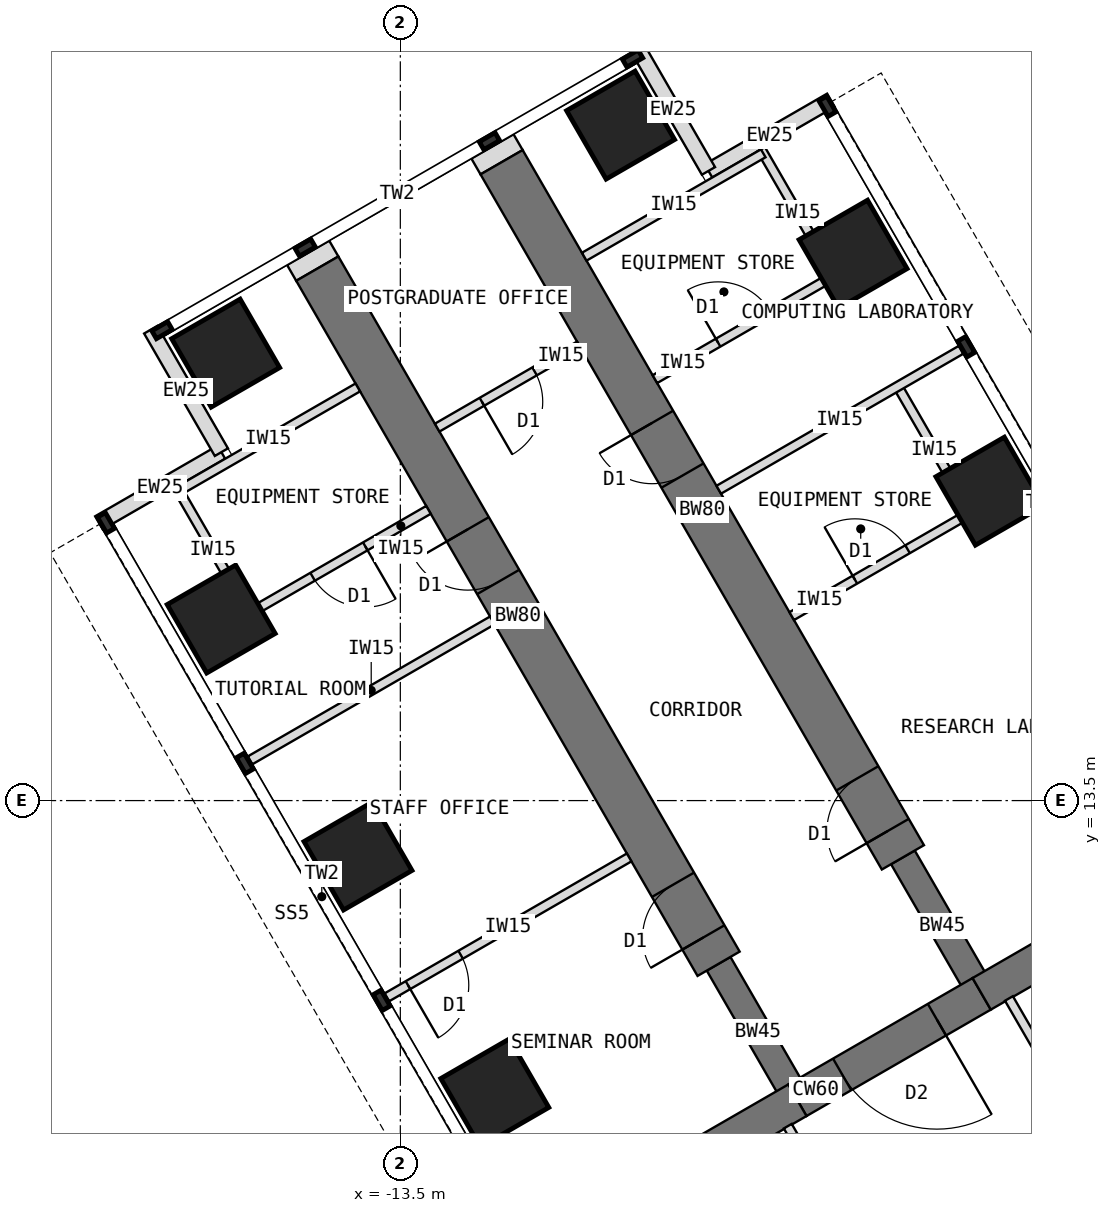
"""IFC4 building model, lengths in metres.
Left out: names, types, materials, properties, quantities, classifications, styles, units other than length and angle.
Written with IfcOpenShell. Run it as: python <this file> out.ifc"""

import sys

from ifc_helpers import new_model, si_unit, direction, frame, frame_2d, origin, origin_2d, place, context, subcontext, project, spatial, rectangle, extrude, element, fill, save


model = new_model("IFC4")
c1 = context("Model", 3, precision=1e-05, world=origin(), true_north=direction((0.0, 1.0)))
c2 = subcontext(c1, "Body", "Model", "MODEL_VIEW")
j1 = project(units=[si_unit("LENGTHUNIT", "METRE"), si_unit("PLANEANGLEUNIT", "RADIAN")], contexts=[c1])
p1 = place(None, origin())
s1 = spatial("IfcSite", under=j1, at=p1, CompositionType="ELEMENT")
p2 = place(p1, origin())
s2 = spatial("IfcBuilding", under=s1, at=p2, CompositionType="ELEMENT")
p3 = place(p2, frame((0.0, 0.0, 133.5)))
s3 = spatial("IfcBuildingStorey", under=s2, at=p3, CompositionType="ELEMENT", Elevation=133.5)
p4 = place(p3, frame((0.0, 12.596, 0.0), z_axis=(0.0, 0.0, 1.0), x_axis=(-0.866011268655, -0.500024481964, 0.0)))
e1 = element("IfcWall", 1, at=p4, inside=s3, PredefinedType="SHEAR", context=c2, shape_type="SweptSolid", body=[
    extrude(rectangle(XDim=4.548, YDim=0.6, at=frame_2d((2.274, 0.0))), origin(), (0.0, 0.0, 1.0), 4.0),
])
p5 = place(p3, frame((-3.939, 10.322, 0.0), z_axis=(0.0, 0.0, 1.0), x_axis=(-0.866019471182, -0.500010275428, 0.0)))
e2 = element("IfcWall", 2, at=p5, inside=s3, PredefinedType="SHEAR", context=c2, shape_type="SweptSolid", body=[
    extrude(rectangle(XDim=3.5, YDim=0.6, at=frame_2d((1.75, 0.0))), origin(), (0.0, 0.0, 1.0), 4.0),
])
p6 = place(p5, frame((0.85, 0.0, 0.0)))
e3 = element("IfcOpeningElement", 3, at=p6, cuts=e2, PredefinedType="OPENING", context=c2, shape_type="SweptSolid", body=[
    extrude(rectangle(XDim=1.8, YDim=2.1, at=frame_2d((0.9, 1.05))), frame((0.0, 0.31, 0.0), z_axis=(0.0, -1.0, 0.0), x_axis=(1.0, 0.0, 0.0)), (0.0, 0.0, 1.0), 0.62),
])
p7 = place(p3, frame((-6.97, 8.572, 0.0), z_axis=(0.0, 0.0, 1.0), x_axis=(-0.866034513004, -0.499984222037, 0.0)))
e4 = element("IfcWall", 4, at=p7, inside=s3, PredefinedType="SHEAR", context=c2, shape_type="SweptSolid", body=[
    extrude(rectangle(XDim=4.548, YDim=0.6, at=frame_2d((2.274, 0.0))), origin(), (0.0, 0.0, 1.0), 4.0),
])
p8 = place(p3, frame((-6.97, 8.572, 0.0), z_axis=(0.0, 0.0, 1.0), x_axis=(-0.499988811324, 0.866031863473, 0.0)))
e5 = element("IfcWall", 5, at=p8, inside=s3, PredefinedType="SHEAR", context=c2, shape_type="SweptSolid", body=[
    extrude(rectangle(XDim=2.592, YDim=0.45, at=frame_2d((1.296, 0.0))), origin(), (0.0, 0.0, 1.0), 4.0),
])
p9 = place(p3, frame((-8.266, 10.816, 0.0), z_axis=(0.0, 0.0, 1.0), x_axis=(-0.499996231654, 0.866027579429, 0.0)))
e6 = element("IfcWall", 6, at=p9, inside=s3, PredefinedType="SHEAR", context=c2, shape_type="SweptSolid", body=[
    extrude(rectangle(XDim=13.2, YDim=0.8, at=frame_2d((6.6, 0.0))), origin(), (0.0, 0.0, 1.0), 4.0),
])
p10 = place(p9, frame((0.5, 0.0, 0.0)))
e7 = element("IfcOpeningElement", 7, at=p10, cuts=e6, PredefinedType="OPENING", context=c2, shape_type="SweptSolid", body=[
    extrude(rectangle(XDim=1.0, YDim=2.1, at=frame_2d((0.5, 1.05))), frame((0.0, 0.41, 0.0), z_axis=(0.0, -1.0, 0.0), x_axis=(1.0, 0.0, 0.0)), (0.0, 0.0, 1.0), 0.82),
])
p11 = place(p9, frame((7.25, 0.0, 0.0)))
e8 = element("IfcOpeningElement", 8, at=p11, cuts=e6, PredefinedType="OPENING", context=c2, shape_type="SweptSolid", body=[
    extrude(rectangle(XDim=1.0, YDim=2.1, at=frame_2d((0.5, 1.05))), frame((0.0, 0.41, 0.0), z_axis=(0.0, -1.0, 0.0), x_axis=(1.0, 0.0, 0.0)), (0.0, 0.0, 1.0), 0.82),
])
p12 = place(p3, frame((-3.939, 10.322, 0.0), z_axis=(0.0, 0.0, 1.0), x_axis=(-0.499918158782, 0.866072649678, 0.0)))
e9 = element("IfcWall", 9, at=p12, inside=s3, PredefinedType="SHEAR", context=c2, shape_type="SweptSolid", body=[
    extrude(rectangle(XDim=2.592, YDim=0.45, at=frame_2d((1.296, 0.0))), origin(), (0.0, 0.0, 1.0), 4.0),
])
p13 = place(p3, frame((-5.234, 12.566, 0.0), z_axis=(0.0, 0.0, 1.0), x_axis=(-0.500010103361, 0.866019570528, 0.0)))
e10 = element("IfcWall", 10, at=p13, inside=s3, PredefinedType="SHEAR", context=c2, shape_type="SweptSolid", body=[
    extrude(rectangle(XDim=13.2, YDim=0.8, at=frame_2d((6.6, 0.0))), origin(), (0.0, 0.0, 1.0), 4.0),
])
p14 = place(p13, frame((0.5, 0.0, 0.0)))
e11 = element("IfcOpeningElement", 11, at=p14, cuts=e10, PredefinedType="OPENING", context=c2, shape_type="SweptSolid", body=[
    extrude(rectangle(XDim=1.0, YDim=2.1, at=frame_2d((0.5, 1.05))), frame((0.0, 0.41, 0.0), z_axis=(0.0, -1.0, 0.0), x_axis=(1.0, 0.0, 0.0)), (0.0, 0.0, 1.0), 0.82),
])
p15 = place(p13, frame((7.25, 0.0, 0.0)))
e12 = element("IfcOpeningElement", 12, at=p15, cuts=e10, PredefinedType="OPENING", context=c2, shape_type="SweptSolid", body=[
    extrude(rectangle(XDim=1.0, YDim=2.1, at=frame_2d((0.5, 1.05))), frame((0.0, 0.41, 0.0), z_axis=(0.0, -1.0, 0.0), x_axis=(1.0, 0.0, 0.0)), (0.0, 0.0, 1.0), 0.82),
])
for number, where, z_axis, x_axis in (
    (13, (-11.946, 8.691, 0.0), (0.0, 0.0, 1.0), (0.866, 0.5, 0.0)),
    (14, (-14.196, 12.588, 0.0), (0.0, 0.0, 1.0), (0.866, 0.5, 0.0)),
    (15, (-3.804, 18.588, 0.0), (0.0, 0.0, 1.0), (0.866, 0.5, 0.0)),
    (16, (-16.446, 16.486, 0.0), (0.0, 0.0, 1.0), (0.866, 0.5, 0.0)),
    (17, (-6.054, 22.486, 0.0), (0.0, 0.0, 1.0), (0.866, 0.5, 0.0)),
    (18, (-16.373, 20.858, 0.0), (0.0, 0.0, 1.0), (0.866, 0.5, 0.0)),
    (19, (-9.877, 24.608, 0.0), (0.0, 0.0, 1.0), (0.866, 0.5, 0.0)),
):
    element("IfcColumn", number, at=place(p3, frame(where, z_axis=z_axis, x_axis=x_axis)), inside=s3, PredefinedType="COLUMN", context=c2, shape_type="SweptSolid", body=[
        extrude(rectangle(XDim=1.3, YDim=1.3, at=origin_2d()), origin(), (0.0, 0.0, 1.0), 4.0),
    ])
for number, where, z_axis, x_axis in (
    (20, (-18.456, 18.067, 0.0), (0.0, 0.0, 1.0), (0.866, 0.5, 0.0)),
    (21, (-16.443, 19.23, 0.0), (0.0, 0.0, 1.0), (-0.5, 0.866, 0.0)),
    (22, (-6.419, 25.017, 0.0), (0.0, 0.0, 1.0), (-0.866, -0.5, 0.0)),
    (23, (-8.432, 23.855, 0.0), (0.0, 0.0, 1.0), (-0.5, 0.866, 0.0)),
):
    element("IfcWall", number, at=place(p3, frame(where, z_axis=z_axis, x_axis=x_axis)), inside=s3, PredefinedType="STANDARD", context=c2, shape_type="SweptSolid", body=[
        extrude(rectangle(XDim=2.325, YDim=0.25, at=frame_2d((1.163, 0.0))), origin(), (0.0, 0.0, 1.0), 3.8),
    ])
p16 = place(p3, frame((-14.865, 22.248, 0.0), z_axis=(0.0, 0.0, 1.0), x_axis=(-0.500426713919, 0.865778900179, 0.0)))
e24 = element("IfcWall", 24, at=p16, inside=s3, PredefinedType="PARTITIONING", context=c2, shape_type="SweptSolid", body=[
    extrude(rectangle(XDim=0.3, YDim=0.8, at=frame_2d((0.15, 0.0))), origin(), (0.0, 0.0, 1.0), 3.8),
])
p17 = place(p3, frame((-11.834, 23.998, 0.0), z_axis=(0.0, 0.0, 1.0), x_axis=(-0.499816412211, 0.866131372301, 0.0)))
e25 = element("IfcWall", 25, at=p17, inside=s3, PredefinedType="PARTITIONING", context=c2, shape_type="SweptSolid", body=[
    extrude(rectangle(XDim=0.3, YDim=0.8, at=frame_2d((0.15, 0.0))), origin(), (0.0, 0.0, 1.0), 3.8),
])
p18 = place(p3, frame((-9.737, 12.565, 0.0), z_axis=(0.0, 0.0, 1.0), x_axis=(-0.866016770315, -0.500014953309, 0.0)))
e26 = element("IfcWall", 26, at=p18, inside=s3, PredefinedType="PARTITIONING", context=c2, shape_type="SweptSolid", body=[
    extrude(rectangle(XDim=4.6, YDim=0.15, at=frame_2d((2.3, 0.0))), origin(), (0.0, 0.0, 1.0), 3.8),
])
p19 = place(p18, frame((3.2, 0.0, 0.0)))
e27 = element("IfcOpeningElement", 27, at=p19, cuts=e26, PredefinedType="OPENING", context=c2, shape_type="SweptSolid", body=[
    extrude(rectangle(XDim=1.0, YDim=2.1, at=frame_2d((0.5, 1.05))), frame((0.0, 0.085, 0.0), z_axis=(0.0, -1.0, 0.0), x_axis=(1.0, 0.0, 0.0)), (0.0, 0.0, 1.0), 0.17),
])
p20 = place(p3, frame((-11.987, 16.462, 0.0), z_axis=(0.0, 0.0, 1.0), x_axis=(-0.866039752405, -0.499975146636, 0.0)))
e28 = element("IfcWall", 28, at=p20, inside=s3, PredefinedType="PARTITIONING", context=c2, shape_type="SweptSolid", body=[
    extrude(rectangle(XDim=4.6, YDim=0.15, at=frame_2d((2.3, 0.0))), origin(), (0.0, 0.0, 1.0), 3.8),
])
p21 = place(p3, frame((-15.981, 16.581, 0.0), z_axis=(0.0, 0.0, 1.0), x_axis=(-0.499957262057, 0.866050077142, 0.0)))
e29 = element("IfcWall", 29, at=p21, inside=s3, PredefinedType="PARTITIONING", context=c2, shape_type="SweptSolid", body=[
    extrude(rectangle(XDim=2.4, YDim=0.15, at=frame_2d((1.2, 0.0))), origin(), (0.0, 0.0, 1.0), 3.8),
])
p22 = place(p3, frame((-13.037, 18.281, 0.0), z_axis=(0.0, 0.0, 1.0), x_axis=(-0.866007419912, -0.500031147688, 0.0)))
e30 = element("IfcWall", 30, at=p22, inside=s3, PredefinedType="PARTITIONING", context=c2, shape_type="SweptSolid", body=[
    extrude(rectangle(XDim=3.4, YDim=0.15, at=frame_2d((1.7, 0.0))), origin(), (0.0, 0.0, 1.0), 3.8),
])
p23 = place(p22, frame((1.2, 0.0, 0.0)))
e31 = element("IfcOpeningElement", 31, at=p23, cuts=e30, PredefinedType="OPENING", context=c2, shape_type="SweptSolid", body=[
    extrude(rectangle(XDim=1.0, YDim=2.1, at=frame_2d((0.5, 1.05))), frame((0.0, 0.085, 0.0), z_axis=(0.0, -1.0, 0.0), x_axis=(1.0, 0.0, 0.0)), (0.0, 0.0, 1.0), 0.17),
])
p24 = place(p3, frame((-14.199, 20.294, 0.0), z_axis=(0.0, 0.0, 1.0), x_axis=(-0.866038511948, -0.499977295307, 0.0)))
e32 = element("IfcWall", 32, at=p24, inside=s3, PredefinedType="PARTITIONING", context=c2, shape_type="SweptSolid", body=[
    extrude(rectangle(XDim=3.4, YDim=0.15, at=frame_2d((1.7, 0.0))), origin(), (0.0, 0.0, 1.0), 3.8),
])
p25 = place(p3, frame((-8.263, 18.612, 0.0), z_axis=(0.0, 0.0, 1.0), x_axis=(0.866016770315, 0.500014953309, 0.0)))
e33 = element("IfcWall", 33, at=p25, inside=s3, PredefinedType="PARTITIONING", context=c2, shape_type="SweptSolid", body=[
    extrude(rectangle(XDim=4.6, YDim=0.15, at=frame_2d((2.3, 0.0))), origin(), (0.0, 0.0, 1.0), 3.8),
])
p26 = place(p3, frame((-4.119, 18.234, 0.0), z_axis=(0.0, 0.0, 1.0), x_axis=(-0.500001309137, 0.866024647952, 0.0)))
e34 = element("IfcWall", 34, at=p26, inside=s3, PredefinedType="PARTITIONING", context=c2, shape_type="SweptSolid", body=[
    extrude(rectangle(XDim=2.4, YDim=0.15, at=frame_2d((1.2, 0.0))), origin(), (0.0, 0.0, 1.0), 3.8),
])
p27 = place(p3, frame((-7.063, 16.533, 0.0), z_axis=(0.0, 0.0, 1.0), x_axis=(0.865989465428, 0.500062241894, 0.0)))
e35 = element("IfcWall", 35, at=p27, inside=s3, PredefinedType="PARTITIONING", context=c2, shape_type="SweptSolid", body=[
    extrude(rectangle(XDim=3.4, YDim=0.15, at=frame_2d((1.7, 0.0))), origin(), (0.0, 0.0, 1.0), 3.8),
])
p28 = place(p27, frame((1.2, 0.0, 0.0)))
e36 = element("IfcOpeningElement", 36, at=p28, cuts=e35, PredefinedType="OPENING", context=c2, shape_type="SweptSolid", body=[
    extrude(rectangle(XDim=1.0, YDim=2.1, at=frame_2d((0.5, 1.05))), frame((0.0, 0.085, 0.0), z_axis=(0.0, -1.0, 0.0), x_axis=(1.0, 0.0, 0.0)), (0.0, 0.0, 1.0), 0.17),
])
p29 = place(p3, frame((-6.369, 22.131, 0.0), z_axis=(0.0, 0.0, 1.0), x_axis=(-0.499957262057, 0.866050077142, 0.0)))
e37 = element("IfcWall", 37, at=p29, inside=s3, PredefinedType="PARTITIONING", context=c2, shape_type="SweptSolid", body=[
    extrude(rectangle(XDim=2.4, YDim=0.15, at=frame_2d((1.2, 0.0))), origin(), (0.0, 0.0, 1.0), 3.8),
])
p30 = place(p3, frame((-9.313, 20.431, 0.0), z_axis=(0.0, 0.0, 1.0), x_axis=(0.866020560687, 0.500008388397, 0.0)))
e38 = element("IfcWall", 38, at=p30, inside=s3, PredefinedType="PARTITIONING", context=c2, shape_type="SweptSolid", body=[
    extrude(rectangle(XDim=3.4, YDim=0.15, at=frame_2d((1.7, 0.0))), origin(), (0.0, 0.0, 1.0), 3.8),
])
p31 = place(p30, frame((1.2, 0.0, 0.0)))
e39 = element("IfcOpeningElement", 39, at=p31, cuts=e38, PredefinedType="OPENING", context=c2, shape_type="SweptSolid", body=[
    extrude(rectangle(XDim=1.0, YDim=2.1, at=frame_2d((0.5, 1.05))), frame((0.0, 0.085, 0.0), z_axis=(0.0, -1.0, 0.0), x_axis=(1.0, 0.0, 0.0)), (0.0, 0.0, 1.0), 0.17),
])
p32 = place(p3, frame((-10.476, 22.444, 0.0), z_axis=(0.0, 0.0, 1.0), x_axis=(0.866007419912, 0.500031147688, 0.0)))
e40 = element("IfcWall", 40, at=p32, inside=s3, PredefinedType="PARTITIONING", context=c2, shape_type="SweptSolid", body=[
    extrude(rectangle(XDim=3.4, YDim=0.15, at=frame_2d((1.7, 0.0))), origin(), (0.0, 0.0, 1.0), 3.8),
])
p33 = place(p3, frame((-4.89, 4.27, 0.0), z_axis=(0.0, 0.0, 1.0), x_axis=(-0.499999473313, 0.866025707867, 0.0)))
e41 = element("IfcWall", 41, at=p33, inside=s3, PredefinedType="PARTITIONING", context=c2, shape_type="SweptSolid", body=[
    extrude(rectangle(XDim=4.476, YDim=0.15, at=frame_2d((2.238, 0.0))), origin(), (0.0, 0.0, 1.0), 3.8),
])
p34 = place(p33, frame((0.843, 0.0, 0.0)))
e42 = element("IfcOpeningElement", 42, at=p34, cuts=e41, PredefinedType="OPENING", context=c2, shape_type="SweptSolid", body=[
    extrude(rectangle(XDim=1.0, YDim=2.1, at=frame_2d((0.5, 1.05))), frame((0.0, 0.085, 0.0), z_axis=(0.0, -1.0, 0.0), x_axis=(1.0, 0.0, 0.0)), (0.0, 0.0, 1.0), 0.17),
])
p35 = place(p3, frame((-3.49, 10.246, 0.0), z_axis=(0.0, 0.0, 1.0), x_axis=(0.499999473313, -0.866025707867, 0.0)))
e43 = element("IfcWall", 43, at=p35, inside=s3, PredefinedType="PARTITIONING", context=c2, shape_type="SweptSolid", body=[
    extrude(rectangle(XDim=4.476, YDim=0.15, at=frame_2d((2.238, 0.0))), origin(), (0.0, 0.0, 1.0), 3.8),
])
p36 = place(p35, frame((0.843, 0.0, 0.0)))
e44 = element("IfcOpeningElement", 44, at=p36, cuts=e43, PredefinedType="OPENING", context=c2, shape_type="SweptSolid", body=[
    extrude(rectangle(XDim=1.0, YDim=2.1, at=frame_2d((0.5, 1.05))), frame((0.0, 0.085, 0.0), z_axis=(0.0, -1.0, 0.0), x_axis=(1.0, 0.0, 0.0)), (0.0, 0.0, 1.0), 0.17),
])
p37 = place(p3, frame((-10.556, 20.983, 0.0), z_axis=(0.0, 0.0, 1.0), x_axis=(-0.86599734893, -0.500048589285, 0.0)))
e45 = element("IfcWall", 45, at=p37, inside=s3, PredefinedType="PARTITIONING", context=c2, shape_type="SweptSolid", body=[
    extrude(rectangle(XDim=2.7, YDim=0.15, at=frame_2d((1.35, 0.0))), origin(), (0.0, 0.0, 1.0), 3.8),
])
p38 = place(p37, frame((0.85, 0.0, 0.0)))
e46 = element("IfcOpeningElement", 46, at=p38, cuts=e45, PredefinedType="OPENING", context=c2, shape_type="SweptSolid", body=[
    extrude(rectangle(XDim=1.0, YDim=2.1, at=frame_2d((0.5, 1.05))), frame((0.0, 0.085, 0.0), z_axis=(0.0, -1.0, 0.0), x_axis=(1.0, 0.0, 0.0)), (0.0, 0.0, 1.0), 0.17),
])
p39 = place(p6, origin())
e47 = element("IfcDoor", 47, at=p39, inside=s3, OperationType="DOUBLE_DOOR_DOUBLE_SWING", PredefinedType="DOOR", context=c2, shape_type="SweptSolid", body=[
    extrude(rectangle(XDim=1.72, YDim=2.06, at=frame_2d((0.9, 1.03))), frame((0.0, 0.025, 0.0), z_axis=(0.0, -1.0, 0.0), x_axis=(1.0, 0.0, 0.0)), (0.0, 0.0, 1.0), 0.05),
    extrude(rectangle(XDim=0.04, YDim=2.1, at=frame_2d((0.02, 1.05))), frame((0.0, 0.3, 0.0), z_axis=(0.0, -1.0, 0.0), x_axis=(1.0, 0.0, 0.0)), (0.0, 0.0, 1.0), 0.6),
    extrude(rectangle(XDim=0.04, YDim=2.1, at=frame_2d((1.78, 1.05))), frame((0.0, 0.3, 0.0), z_axis=(0.0, -1.0, 0.0), x_axis=(1.0, 0.0, 0.0)), (0.0, 0.0, 1.0), 0.6),
    extrude(rectangle(XDim=1.72, YDim=0.04, at=frame_2d((0.9, 2.08))), frame((0.0, 0.3, 0.0), z_axis=(0.0, -1.0, 0.0), x_axis=(1.0, 0.0, 0.0)), (0.0, 0.0, 1.0), 0.6),
])
fill(e3, e47)
p40 = place(p19, origin())
e48 = element("IfcDoor", 48, at=p40, inside=s3, OperationType="SINGLE_SWING_RIGHT", PredefinedType="DOOR", context=c2, shape_type="SweptSolid", body=[
    extrude(rectangle(XDim=1.0, YDim=2.1, at=frame_2d((0.5, 1.05))), frame((0.0, 0.025, 0.0), z_axis=(0.0, -1.0, 0.0), x_axis=(1.0, 0.0, 0.0)), (0.0, 0.0, 1.0), 0.05),
])
fill(e27, e48)
p41 = place(p23, origin())
e49 = element("IfcDoor", 49, at=p41, inside=s3, OperationType="SINGLE_SWING_LEFT", PredefinedType="DOOR", context=c2, shape_type="SweptSolid", body=[
    extrude(rectangle(XDim=1.0, YDim=2.1, at=frame_2d((0.5, 1.05))), frame((0.0, 0.025, 0.0), z_axis=(0.0, -1.0, 0.0), x_axis=(1.0, 0.0, 0.0)), (0.0, 0.0, 1.0), 0.05),
])
fill(e31, e49)
p42 = place(p28, origin())
e50 = element("IfcDoor", 50, at=p42, inside=s3, OperationType="SINGLE_SWING_LEFT", PredefinedType="DOOR", context=c2, shape_type="SweptSolid", body=[
    extrude(rectangle(XDim=1.0, YDim=2.1, at=frame_2d((0.5, 1.05))), frame((0.0, 0.025, 0.0), z_axis=(0.0, -1.0, 0.0), x_axis=(1.0, 0.0, 0.0)), (0.0, 0.0, 1.0), 0.05),
])
fill(e36, e50)
p43 = place(p31, origin())
e51 = element("IfcDoor", 51, at=p43, inside=s3, OperationType="SINGLE_SWING_LEFT", PredefinedType="DOOR", context=c2, shape_type="SweptSolid", body=[
    extrude(rectangle(XDim=1.0, YDim=2.1, at=frame_2d((0.5, 1.05))), frame((0.0, 0.025, 0.0), z_axis=(0.0, -1.0, 0.0), x_axis=(1.0, 0.0, 0.0)), (0.0, 0.0, 1.0), 0.05),
])
fill(e39, e51)
p44 = place(p38, origin())
e52 = element("IfcDoor", 52, at=p44, inside=s3, OperationType="SINGLE_SWING_RIGHT", PredefinedType="DOOR", context=c2, shape_type="SweptSolid", body=[
    extrude(rectangle(XDim=1.0, YDim=2.1, at=frame_2d((0.5, 1.05))), frame((0.0, 0.025, 0.0), z_axis=(0.0, -1.0, 0.0), x_axis=(1.0, 0.0, 0.0)), (0.0, 0.0, 1.0), 0.05),
])
fill(e46, e52)
p45 = place(p10, origin())
e53 = element("IfcDoor", 53, at=p45, inside=s3, OperationType="SINGLE_SWING_LEFT", PredefinedType="DOOR", context=c2, shape_type="SweptSolid", body=[
    extrude(rectangle(XDim=0.92, YDim=2.06, at=frame_2d((0.5, 1.03))), frame((0.0, 0.025, 0.0), z_axis=(0.0, -1.0, 0.0), x_axis=(1.0, 0.0, 0.0)), (0.0, 0.0, 1.0), 0.05),
    extrude(rectangle(XDim=0.04, YDim=2.1, at=frame_2d((0.02, 1.05))), frame((0.0, 0.4, 0.0), z_axis=(0.0, -1.0, 0.0), x_axis=(1.0, 0.0, 0.0)), (0.0, 0.0, 1.0), 0.8),
    extrude(rectangle(XDim=0.04, YDim=2.1, at=frame_2d((0.98, 1.05))), frame((0.0, 0.4, 0.0), z_axis=(0.0, -1.0, 0.0), x_axis=(1.0, 0.0, 0.0)), (0.0, 0.0, 1.0), 0.8),
    extrude(rectangle(XDim=0.92, YDim=0.04, at=frame_2d((0.5, 2.08))), frame((0.0, 0.4, 0.0), z_axis=(0.0, -1.0, 0.0), x_axis=(1.0, 0.0, 0.0)), (0.0, 0.0, 1.0), 0.8),
])
fill(e7, e53)
p46 = place(p11, origin())
e54 = element("IfcDoor", 54, at=p46, inside=s3, OperationType="SINGLE_SWING_RIGHT", PredefinedType="DOOR", context=c2, shape_type="SweptSolid", body=[
    extrude(rectangle(XDim=0.92, YDim=2.06, at=frame_2d((0.5, 1.03))), frame((0.0, 0.025, 0.0), z_axis=(0.0, -1.0, 0.0), x_axis=(1.0, 0.0, 0.0)), (0.0, 0.0, 1.0), 0.05),
    extrude(rectangle(XDim=0.04, YDim=2.1, at=frame_2d((0.02, 1.05))), frame((0.0, 0.4, 0.0), z_axis=(0.0, -1.0, 0.0), x_axis=(1.0, 0.0, 0.0)), (0.0, 0.0, 1.0), 0.8),
    extrude(rectangle(XDim=0.04, YDim=2.1, at=frame_2d((0.98, 1.05))), frame((0.0, 0.4, 0.0), z_axis=(0.0, -1.0, 0.0), x_axis=(1.0, 0.0, 0.0)), (0.0, 0.0, 1.0), 0.8),
    extrude(rectangle(XDim=0.92, YDim=0.04, at=frame_2d((0.5, 2.08))), frame((0.0, 0.4, 0.0), z_axis=(0.0, -1.0, 0.0), x_axis=(1.0, 0.0, 0.0)), (0.0, 0.0, 1.0), 0.8),
])
fill(e8, e54)
p47 = place(p14, origin())
e55 = element("IfcDoor", 55, at=p47, inside=s3, OperationType="SINGLE_SWING_LEFT", PredefinedType="DOOR", context=c2, shape_type="SweptSolid", body=[
    extrude(rectangle(XDim=0.92, YDim=2.06, at=frame_2d((0.5, 1.03))), frame((0.0, 0.025, 0.0), z_axis=(0.0, -1.0, 0.0), x_axis=(1.0, 0.0, 0.0)), (0.0, 0.0, 1.0), 0.05),
    extrude(rectangle(XDim=0.04, YDim=2.1, at=frame_2d((0.02, 1.05))), frame((0.0, 0.4, 0.0), z_axis=(0.0, -1.0, 0.0), x_axis=(1.0, 0.0, 0.0)), (0.0, 0.0, 1.0), 0.8),
    extrude(rectangle(XDim=0.04, YDim=2.1, at=frame_2d((0.98, 1.05))), frame((0.0, 0.4, 0.0), z_axis=(0.0, -1.0, 0.0), x_axis=(1.0, 0.0, 0.0)), (0.0, 0.0, 1.0), 0.8),
    extrude(rectangle(XDim=0.92, YDim=0.04, at=frame_2d((0.5, 2.08))), frame((0.0, 0.4, 0.0), z_axis=(0.0, -1.0, 0.0), x_axis=(1.0, 0.0, 0.0)), (0.0, 0.0, 1.0), 0.8),
])
fill(e11, e55)
p48 = place(p15, origin())
e56 = element("IfcDoor", 56, at=p48, inside=s3, OperationType="SINGLE_SWING_RIGHT", PredefinedType="DOOR", context=c2, shape_type="SweptSolid", body=[
    extrude(rectangle(XDim=0.92, YDim=2.06, at=frame_2d((0.5, 1.03))), frame((0.0, 0.025, 0.0), z_axis=(0.0, -1.0, 0.0), x_axis=(1.0, 0.0, 0.0)), (0.0, 0.0, 1.0), 0.05),
    extrude(rectangle(XDim=0.04, YDim=2.1, at=frame_2d((0.02, 1.05))), frame((0.0, 0.4, 0.0), z_axis=(0.0, -1.0, 0.0), x_axis=(1.0, 0.0, 0.0)), (0.0, 0.0, 1.0), 0.8),
    extrude(rectangle(XDim=0.04, YDim=2.1, at=frame_2d((0.98, 1.05))), frame((0.0, 0.4, 0.0), z_axis=(0.0, -1.0, 0.0), x_axis=(1.0, 0.0, 0.0)), (0.0, 0.0, 1.0), 0.8),
    extrude(rectangle(XDim=0.92, YDim=0.04, at=frame_2d((0.5, 2.08))), frame((0.0, 0.4, 0.0), z_axis=(0.0, -1.0, 0.0), x_axis=(1.0, 0.0, 0.0)), (0.0, 0.0, 1.0), 0.8),
])
fill(e12, e56)
save(model, sys.argv[1])
